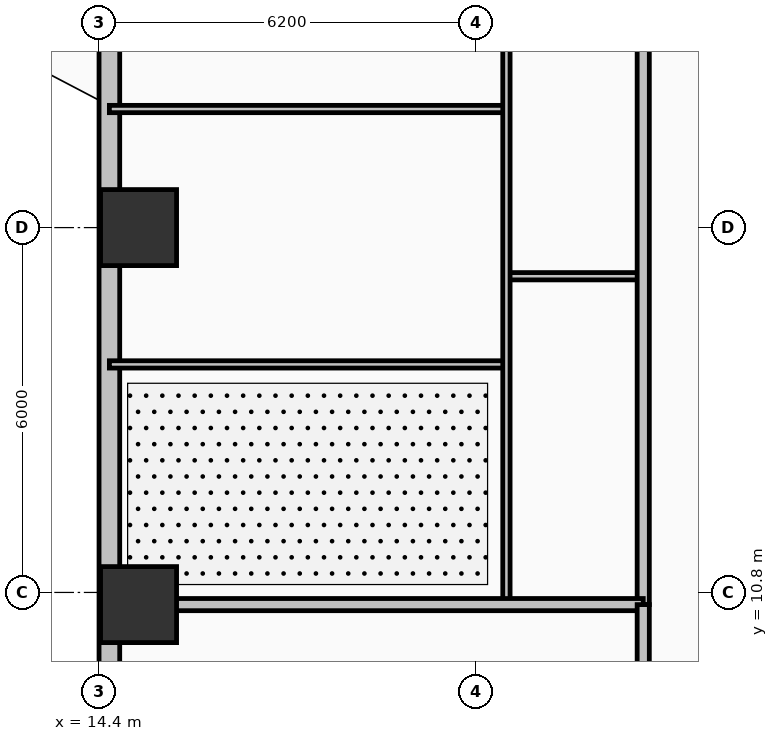
"""IFC4 building model, lengths in metres.
Left out: names, types, materials, properties, quantities, classifications, styles, units other than length and angle.
Written with IfcOpenShell. Run it as: python <this file> out.ifc"""

import sys

from ifc_helpers import new_model, si_unit, direction, frame, frame_2d, origin, origin_2d, place, context, subcontext, project, spatial, rectangle, extrude, element, fill, save


model = new_model("IFC4")
c1 = context("Model", 3, precision=1e-05, world=origin(), true_north=direction((0.0, 1.0)))
c2 = subcontext(c1, "Body", "Model", "MODEL_VIEW")
j1 = project(units=[si_unit("LENGTHUNIT", "METRE"), si_unit("PLANEANGLEUNIT", "RADIAN")], contexts=[c1])
p1 = place(None, origin())
s1 = spatial("IfcSite", under=j1, at=p1, CompositionType="ELEMENT")
p2 = place(p1, origin())
s2 = spatial("IfcBuilding", under=s1, at=p2, CompositionType="ELEMENT")
p3 = place(p2, frame((0.0, 0.0, 36.2)))
s3 = spatial("IfcBuildingStorey", under=s2, at=p3, CompositionType="ELEMENT", Elevation=36.2)
for number, where, z_axis, x_axis in (
    (1, (15.05, 10.6, 0.0), (0.0, 0.0, 1.0), (1.0, 0.0, 0.0)),
    (2, (15.05, 16.8, 0.0), (0.0, 0.0, 1.0), (1.0, 0.0, 0.0)),
):
    element("IfcColumn", number, at=place(p3, frame(where, z_axis=z_axis, x_axis=x_axis)), inside=s3, PredefinedType="COLUMN", context=c2, shape_type="SweptSolid", body=[
        extrude(rectangle(XDim=1.25, YDim=1.25, at=origin_2d()), origin(), (0.0, 0.0, 1.0), 3.7),
    ])
p4 = place(p3, frame((14.57, 23.8, 0.0), z_axis=(0.0, 0.0, 1.0), x_axis=(0.0, -1.0, 0.0)))
e3 = element("IfcWall", 3, at=p4, inside=s3, PredefinedType="SOLIDWALL", context=c2, shape_type="SweptSolid", body=[
    extrude(rectangle(XDim=14.8, YDim=0.34, at=frame_2d((7.4, 0.0))), origin(), (0.0, 0.0, 1.0), 2.7),
])
p5 = place(p4, frame((1.7, 0.0, 0.0)))
e4 = element("IfcOpeningElement", 4, at=p5, cuts=e3, PredefinedType="OPENING", context=c2, shape_type="SweptSolid", body=[
    extrude(rectangle(XDim=1.6, YDim=2.1, at=frame_2d((0.8, 1.05))), frame((0.0, 0.18, 0.0), z_axis=(0.0, -1.0, 0.0), x_axis=(1.0, 0.0, 0.0)), (0.0, 0.0, 1.0), 0.36),
])
p6 = place(p4, frame((7.68, 0.0, 0.89)))
e5 = element("IfcOpeningElement", 5, at=p6, cuts=e3, PredefinedType="OPENING", context=c2, shape_type="SweptSolid", body=[
    extrude(rectangle(XDim=1.1, YDim=1.65, at=frame_2d((0.55, 0.825))), frame((0.0, 0.18, 0.0), z_axis=(0.0, -1.0, 0.0), x_axis=(1.0, 0.0, 0.0)), (0.0, 0.0, 1.0), 0.36),
])
p7 = place(p4, frame((9.9, 0.0, 0.93)))
e6 = element("IfcOpeningElement", 6, at=p7, cuts=e3, PredefinedType="OPENING", context=c2, shape_type="SweptSolid", body=[
    extrude(rectangle(XDim=1.1, YDim=1.65, at=frame_2d((0.55, 0.825))), frame((0.0, 0.18, 0.0), z_axis=(0.0, -1.0, 0.0), x_axis=(1.0, 0.0, 0.0)), (0.0, 0.0, 1.0), 0.36),
])
p8 = place(p3, frame((21.1, 16.0, 0.0), z_axis=(0.0, 0.0, 1.0), x_axis=(1.0, 0.0, 0.0)))
e7 = element("IfcWall", 7, at=p8, inside=s3, PredefinedType="PARTITIONING", context=c2, shape_type="SweptSolid", body=[
    extrude(rectangle(XDim=2.25, YDim=0.12, at=frame_2d((1.125, 0.0))), origin(), (0.0, 0.0, 1.0), 2.53),
])
p9 = place(p8, frame((0.6, 0.0, 0.0)))
e8 = element("IfcOpeningElement", 8, at=p9, cuts=e7, PredefinedType="OPENING", context=c2, shape_type="SweptSolid", body=[
    extrude(rectangle(XDim=0.85, YDim=2.1, at=frame_2d((0.425, 1.05))), frame((0.0, 0.07, 0.0), z_axis=(0.0, -1.0, 0.0), x_axis=(1.0, 0.0, 0.0)), (0.0, 0.0, 1.0), 0.14),
])
p10 = place(p3, frame((14.57, 14.55, 0.0), z_axis=(0.0, 0.0, 1.0), x_axis=(1.0, 0.0, 0.0)))
e9 = element("IfcWall", 9, at=p10, inside=s3, PredefinedType="PARTITIONING", context=c2, shape_type="SweptSolid", body=[
    extrude(rectangle(XDim=6.53, YDim=0.12, at=frame_2d((3.265, 0.0))), origin(), (0.0, 0.0, 1.0), 2.53),
])
p11 = place(p10, frame((5.18, 0.0, 0.0)))
e10 = element("IfcOpeningElement", 10, at=p11, cuts=e9, PredefinedType="OPENING", context=c2, shape_type="SweptSolid", body=[
    extrude(rectangle(XDim=0.9, YDim=2.1, at=frame_2d((0.45, 1.05))), frame((0.0, 0.07, 0.0), z_axis=(0.0, -1.0, 0.0), x_axis=(1.0, 0.0, 0.0)), (0.0, 0.0, 1.0), 0.14),
])
p12 = place(p3, frame((14.57, 18.75, 0.0), z_axis=(0.0, 0.0, 1.0), x_axis=(1.0, 0.0, 0.0)))
e11 = element("IfcWall", 11, at=p12, inside=s3, PredefinedType="PARTITIONING", context=c2, shape_type="SweptSolid", body=[
    extrude(rectangle(XDim=6.53, YDim=0.12, at=frame_2d((3.265, 0.0))), origin(), (0.0, 0.0, 1.0), 2.53),
])
p13 = place(p12, frame((5.18, 0.0, 0.0)))
e12 = element("IfcOpeningElement", 12, at=p13, cuts=e11, PredefinedType="OPENING", context=c2, shape_type="SweptSolid", body=[
    extrude(rectangle(XDim=0.9, YDim=2.1, at=frame_2d((0.45, 1.05))), frame((0.0, 0.07, 0.0), z_axis=(0.0, -1.0, 0.0), x_axis=(1.0, 0.0, 0.0)), (0.0, 0.0, 1.0), 0.14),
])
p14 = place(p3, frame((21.1, 10.64, 0.0), z_axis=(0.0, 0.0, 1.0), x_axis=(0.0, 1.0, 0.0)))
e13 = element("IfcWall", 13, at=p14, inside=s3, PredefinedType="PARTITIONING", context=c2, shape_type="SweptSolid", body=[
    extrude(rectangle(XDim=12.02, YDim=0.12, at=frame_2d((6.01, 0.0))), origin(), (0.0, 0.0, 1.0), 2.53),
])
p15 = place(p14, frame((0.41, 0.0, 0.0)))
e14 = element("IfcOpeningElement", 14, at=p15, cuts=e13, PredefinedType="OPENING", context=c2, shape_type="SweptSolid", body=[
    extrude(rectangle(XDim=0.9, YDim=2.1, at=frame_2d((0.45, 1.05))), frame((0.0, 0.07, 0.0), z_axis=(0.0, -1.0, 0.0), x_axis=(1.0, 0.0, 0.0)), (0.0, 0.0, 1.0), 0.14),
])
p16 = place(p14, frame((10.185, 0.0, 0.0)))
e15 = element("IfcOpeningElement", 15, at=p16, cuts=e13, PredefinedType="OPENING", context=c2, shape_type="SweptSolid", body=[
    extrude(rectangle(XDim=0.82, YDim=2.08, at=frame_2d((0.41, 1.04))), frame((0.0, 0.07, 0.0), z_axis=(0.0, -1.0, 0.0), x_axis=(1.0, 0.0, 0.0)), (0.0, 0.0, 1.0), 0.14),
])
p17 = place(p3, frame((23.35, 10.6, 0.0), z_axis=(0.0, 0.0, 1.0), x_axis=(0.0, 1.0, 0.0)))
e16 = element("IfcWall", 16, at=p17, inside=s3, PredefinedType="PARTITIONING", context=c2, shape_type="SweptSolid", body=[
    extrude(rectangle(XDim=35.2, YDim=0.2, at=frame_2d((17.6, 0.0))), origin(), (0.0, 0.0, 1.0), 2.53),
])
p18 = place(p17, frame((2.65, 0.0, 0.0)))
e17 = element("IfcOpeningElement", 17, at=p18, cuts=e16, PredefinedType="OPENING", context=c2, shape_type="SweptSolid", body=[
    extrude(rectangle(XDim=1.0, YDim=2.15, at=frame_2d((0.5, 1.075))), frame((0.0, 0.11, 0.0), z_axis=(0.0, -1.0, 0.0), x_axis=(1.0, 0.0, 0.0)), (0.0, 0.0, 1.0), 0.22),
])
p19 = place(p17, frame((12.65, 0.0, 0.0)))
e18 = element("IfcOpeningElement", 18, at=p19, cuts=e16, PredefinedType="OPENING", context=c2, shape_type="SweptSolid", body=[
    extrude(rectangle(XDim=1.0, YDim=2.15, at=frame_2d((0.5, 1.075))), frame((0.0, 0.11, 0.0), z_axis=(0.0, -1.0, 0.0), x_axis=(1.0, 0.0, 0.0)), (0.0, 0.0, 1.0), 0.22),
])
p20 = place(p17, frame((24.134, 0.0, 0.0)))
e19 = element("IfcOpeningElement", 19, at=p20, cuts=e16, PredefinedType="OPENING", context=c2, shape_type="SweptSolid", body=[
    extrude(rectangle(XDim=1.0, YDim=2.15, at=frame_2d((0.5, 1.075))), frame((0.0, 0.11, 0.0), z_axis=(0.0, -1.0, 0.0), x_axis=(1.0, 0.0, 0.0)), (0.0, 0.0, 1.0), 0.22),
])
p21 = place(p3, frame((14.99, 10.6, 0.0), z_axis=(0.0, 0.0, 1.0), x_axis=(1.0, 0.0, 0.0)))
e20 = element("IfcWall", 20, at=p21, inside=s3, PredefinedType="PARTITIONING", context=c2, shape_type="SweptSolid", body=[
    extrude(rectangle(XDim=8.36, YDim=0.2, at=frame_2d((4.18, 0.0))), origin(), (0.0, 0.0, 1.0), 2.53),
])
p22 = place(p3, frame((23.35, 4.97, 0.0), z_axis=(0.0, 0.0, 1.0), x_axis=(0.0, 1.0, 0.0)))
e21 = element("IfcWall", 21, at=p22, inside=s3, PredefinedType="PARTITIONING", context=c2, shape_type="SweptSolid", body=[
    extrude(rectangle(XDim=5.63, YDim=0.2, at=frame_2d((2.815, 0.0))), origin(), (0.0, 0.0, 1.0), 2.53),
])
p23 = place(p6, origin())
e22 = element("IfcWindow", 22, at=p23, inside=s3, PartitioningType="SINGLE_PANEL", PredefinedType="WINDOW", context=c2, shape_type="SweptSolid", body=[
    extrude(rectangle(XDim=1.1, YDim=1.65, at=frame_2d((0.55, 0.825))), frame((0.0, 0.03, 0.0), z_axis=(0.0, -1.0, 0.0), x_axis=(1.0, 0.0, 0.0)), (0.0, 0.0, 1.0), 0.06),
])
fill(e5, e22)
p24 = place(p7, origin())
e23 = element("IfcWindow", 23, at=p24, inside=s3, PartitioningType="SINGLE_PANEL", PredefinedType="WINDOW", context=c2, shape_type="SweptSolid", body=[
    extrude(rectangle(XDim=1.1, YDim=1.65, at=frame_2d((0.55, 0.825))), frame((0.0, 0.03, 0.0), z_axis=(0.0, -1.0, 0.0), x_axis=(1.0, 0.0, 0.0)), (0.0, 0.0, 1.0), 0.06),
])
fill(e6, e23)
p25 = place(p9, origin())
e24 = element("IfcDoor", 24, at=p25, inside=s3, OperationType="SINGLE_SWING_LEFT", PredefinedType="DOOR", context=c2, shape_type="SweptSolid", body=[
    extrude(rectangle(XDim=0.85, YDim=2.1, at=frame_2d((0.425, 1.05))), frame((0.0, 0.025, 0.0), z_axis=(0.0, -1.0, 0.0), x_axis=(1.0, 0.0, 0.0)), (0.0, 0.0, 1.0), 0.05),
])
fill(e8, e24)
p26 = place(p11, origin())
e25 = element("IfcDoor", 25, at=p26, inside=s3, OperationType="SINGLE_SWING_LEFT", PredefinedType="DOOR", context=c2, shape_type="SweptSolid", body=[
    extrude(rectangle(XDim=0.9, YDim=2.1, at=frame_2d((0.45, 1.05))), frame((0.0, 0.025, 0.0), z_axis=(0.0, -1.0, 0.0), x_axis=(1.0, 0.0, 0.0)), (0.0, 0.0, 1.0), 0.05),
])
fill(e10, e25)
p27 = place(p13, origin())
e26 = element("IfcDoor", 26, at=p27, inside=s3, OperationType="SINGLE_SWING_RIGHT", PredefinedType="DOOR", context=c2, shape_type="SweptSolid", body=[
    extrude(rectangle(XDim=0.9, YDim=2.1, at=frame_2d((0.45, 1.05))), frame((0.0, 0.025, 0.0), z_axis=(0.0, -1.0, 0.0), x_axis=(1.0, 0.0, 0.0)), (0.0, 0.0, 1.0), 0.05),
])
fill(e12, e26)
p28 = place(p15, origin())
e27 = element("IfcDoor", 27, at=p28, inside=s3, OperationType="SINGLE_SWING_RIGHT", PredefinedType="DOOR", context=c2, shape_type="SweptSolid", body=[
    extrude(rectangle(XDim=0.9, YDim=2.1, at=frame_2d((0.45, 1.05))), frame((0.0, 0.025, 0.0), z_axis=(0.0, -1.0, 0.0), x_axis=(1.0, 0.0, 0.0)), (0.0, 0.0, 1.0), 0.05),
])
fill(e14, e27)
p29 = place(p18, origin())
e28 = element("IfcDoor", 28, at=p29, inside=s3, OperationType="SINGLE_SWING_LEFT", PredefinedType="DOOR", context=c2, shape_type="SweptSolid", body=[
    extrude(rectangle(XDim=1.0, YDim=2.15, at=frame_2d((0.5, 1.075))), frame((0.0, 0.025, 0.0), z_axis=(0.0, -1.0, 0.0), x_axis=(1.0, 0.0, 0.0)), (0.0, 0.0, 1.0), 0.05),
])
fill(e17, e28)
save(model, sys.argv[1])
